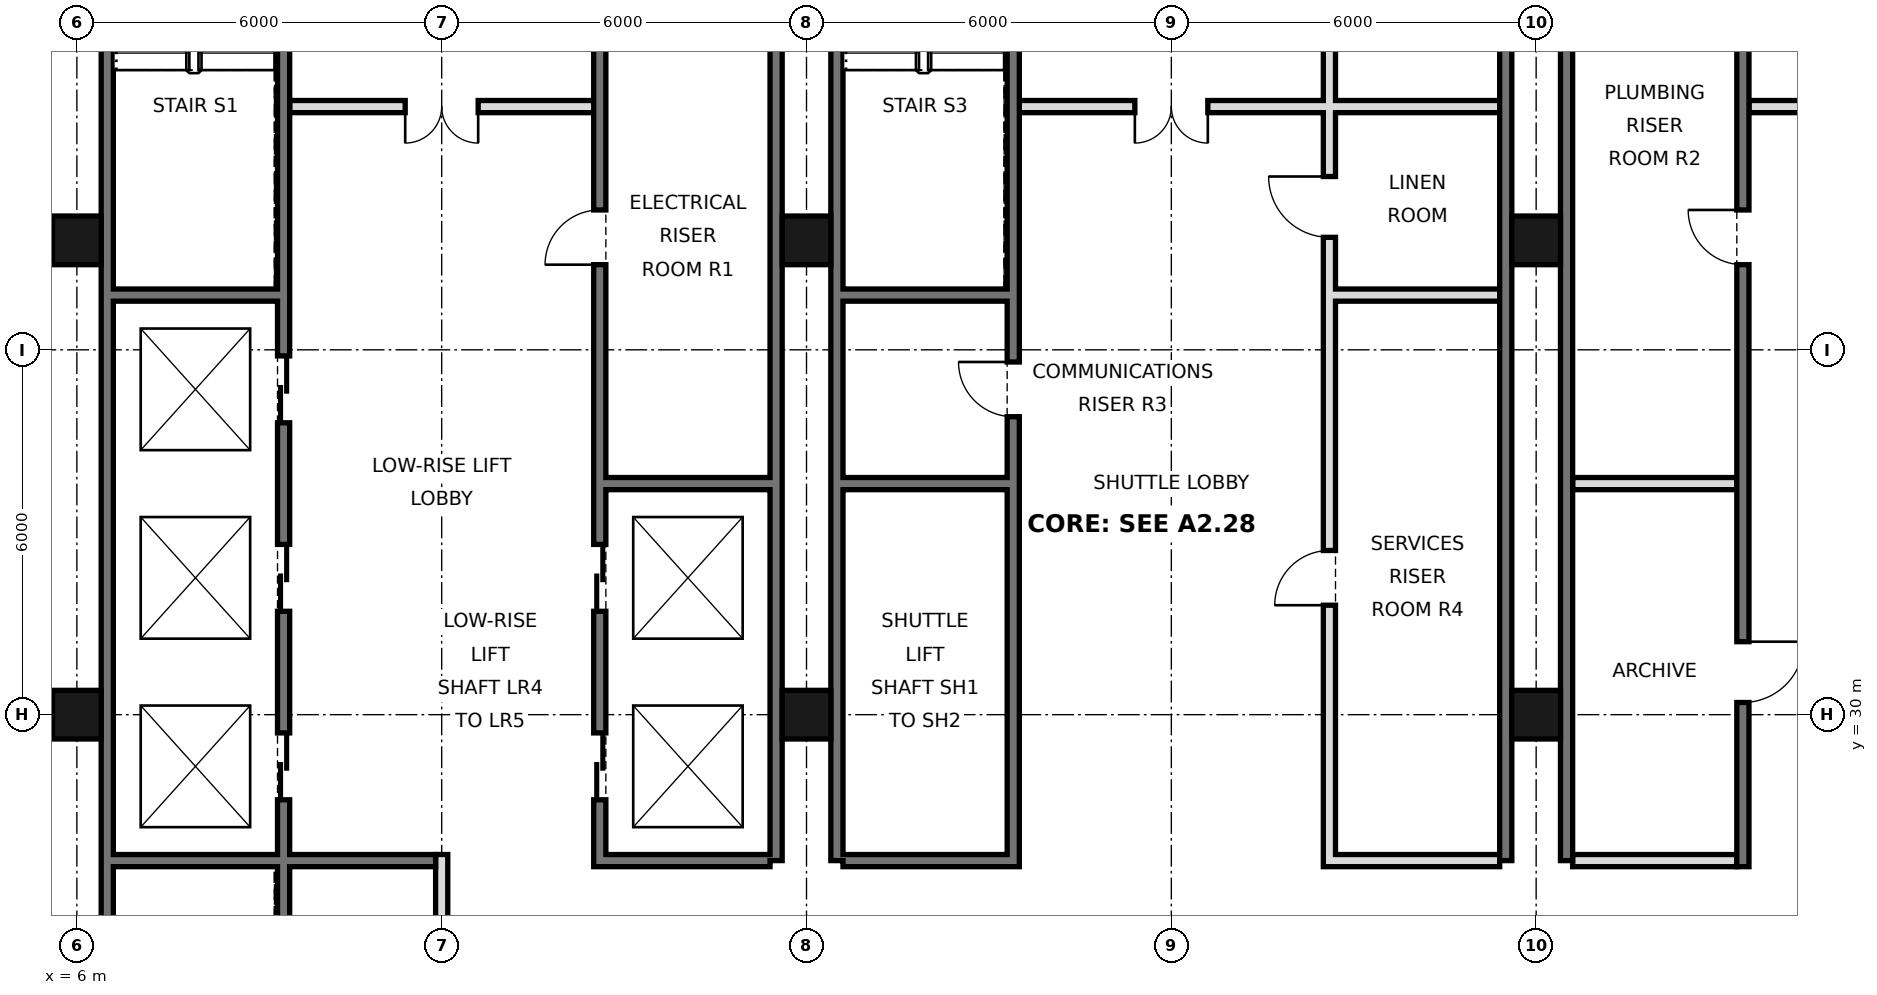
"""IFC4 building model, lengths in metres.
Left out: names, types, materials, properties, quantities, classifications, styles, units other than length and angle.
Written with IfcOpenShell. Run it as: python <this file> out.ifc"""

import sys

from ifc_helpers import new_model, si_unit, direction, frame, frame_2d, origin, origin_2d, place, context, subcontext, project, spatial, rectangle, hollow_rectangle, extrude, element, fill, save


model = new_model("IFC4")
c1 = context("Model", 3, precision=1e-05, world=origin(), true_north=direction((0.0, 1.0)))
c2 = subcontext(c1, "Body", "Model", "MODEL_VIEW")
j1 = project(units=[si_unit("LENGTHUNIT", "METRE"), si_unit("PLANEANGLEUNIT", "RADIAN")], contexts=[c1])
p1 = place(None, origin())
s1 = spatial("IfcSite", under=j1, at=p1, CompositionType="ELEMENT")
p2 = place(p1, origin())
s2 = spatial("IfcBuilding", under=s1, at=p2, CompositionType="ELEMENT")
p3 = place(p2, frame((0.0, 0.0, 110.6)))
s3 = spatial("IfcBuildingStorey", under=s2, at=p3, CompositionType="ELEMENT", Elevation=110.6)
for number, where, z_axis, x_axis in (
    (1, (6.0, 30.0, 0.0), (0.0, 0.0, 1.0), (1.0, 0.0, 0.0)),
    (2, (6.0, 37.8, 0.0), (0.0, 0.0, 1.0), (1.0, 0.0, 0.0)),
    (3, (18.0, 30.0, 0.0), (0.0, 0.0, 1.0), (1.0, 0.0, 0.0)),
    (4, (18.0, 37.8, 0.0), (0.0, 0.0, 1.0), (1.0, 0.0, 0.0)),
    (5, (30.0, 30.0, 0.0), (0.0, 0.0, 1.0), (1.0, 0.0, 0.0)),
    (6, (30.0, 37.8, 0.0), (0.0, 0.0, 1.0), (1.0, 0.0, 0.0)),
):
    element("IfcColumn", number, at=place(p3, frame(where, z_axis=z_axis, x_axis=x_axis)), inside=s3, PredefinedType="COLUMN", context=c2, shape_type="SweptSolid", body=[
        extrude(hollow_rectangle(XDim=0.8, YDim=0.8, WallThickness=0.05, at=origin_2d()), origin(), (0.0, 0.0, 1.0), 3.6),
    ])
p4 = place(p3, frame((6.5, 21.6, 0.0), z_axis=(0.0, 0.0, 1.0), x_axis=(0.0, 1.0, 0.0)))
e7 = element("IfcWall", 7, at=p4, inside=s3, PredefinedType="SOLIDWALL", context=c2, shape_type="SweptSolid", body=[
    extrude(rectangle(XDim=23.5, YDim=0.2, at=frame_2d((11.75, 0.0))), origin(), (0.0, 0.0, 1.0), 3.38),
])
for number, where, z_axis, x_axis in (
    (8, (17.5, 27.6, 0.0), (0.0, 0.0, 1.0), (0.0, 1.0, 0.0)),
    (9, (18.5, 27.6, 0.0), (0.0, 0.0, 1.0), (0.0, 1.0, 0.0)),
    (10, (29.5, 27.6, 0.0), (0.0, 0.0, 1.0), (0.0, 1.0, 0.0)),
    (11, (30.5, 27.6, 0.0), (0.0, 0.0, 1.0), (0.0, 1.0, 0.0)),
):
    element("IfcWall", number, at=place(p3, frame(where, z_axis=z_axis, x_axis=x_axis)), inside=s3, PredefinedType="SOLIDWALL", context=c2, shape_type="SweptSolid", body=[
        extrude(rectangle(XDim=17.5, YDim=0.2, at=frame_2d((8.75, 0.0))), origin(), (0.0, 0.0, 1.0), 3.38),
    ])
p5 = place(p3, frame((12.0, 21.6, 0.0), z_axis=(0.0, 0.0, 1.0), x_axis=(0.0, 1.0, 0.0)))
e12 = element("IfcWall", 12, at=p5, inside=s3, PredefinedType="PARTITIONING", context=c2, shape_type="SweptSolid", body=[
    extrude(rectangle(XDim=6.1, YDim=0.2, at=frame_2d((3.05, 0.0))), origin(), (0.0, 0.0, 1.0), 3.38),
])
p6 = place(p3, frame((14.6, 27.5, 0.0), z_axis=(0.0, 0.0, 1.0), x_axis=(0.0, 1.0, 0.0)))
e13 = element("IfcWall", 13, at=p6, inside=s3, PredefinedType="SOLIDWALL", context=c2, shape_type="SweptSolid", body=[
    extrude(rectangle(XDim=17.5, YDim=0.2, at=frame_2d((8.75, 0.0))), origin(), (0.0, 0.0, 1.0), 3.38),
])
p7 = place(p6, frame((1.1, 0.0, 0.0)))
e14 = element("IfcOpeningElement", 14, at=p7, cuts=e13, PredefinedType="OPENING", context=c2, shape_type="SweptSolid", body=[
    extrude(rectangle(XDim=1.1, YDim=2.1, at=frame_2d((0.55, 1.05))), frame((0.0, 0.11, 0.0), z_axis=(0.0, -1.0, 0.0), x_axis=(1.0, 0.0, 0.0)), (0.0, 0.0, 1.0), 0.22),
])
p8 = place(p6, frame((4.2, 0.0, 0.0)))
e15 = element("IfcOpeningElement", 15, at=p8, cuts=e13, PredefinedType="OPENING", context=c2, shape_type="SweptSolid", body=[
    extrude(rectangle(XDim=1.1, YDim=2.1, at=frame_2d((0.55, 1.05))), frame((0.0, 0.11, 0.0), z_axis=(0.0, -1.0, 0.0), x_axis=(1.0, 0.0, 0.0)), (0.0, 0.0, 1.0), 0.22),
])
p9 = place(p6, frame((15.4, 0.0, 0.0)))
e16 = element("IfcOpeningElement", 16, at=p9, cuts=e13, PredefinedType="OPENING", context=c2, shape_type="SweptSolid", body=[
    extrude(rectangle(XDim=1.1, YDim=2.1, at=frame_2d((0.55, 1.05))), frame((0.0, 0.11, 0.0), z_axis=(0.0, -1.0, 0.0), x_axis=(1.0, 0.0, 0.0)), (0.0, 0.0, 1.0), 0.22),
])
p10 = place(p6, frame((9.9, 0.0, 0.0)))
e17 = element("IfcOpeningElement", 17, at=p10, cuts=e13, PredefinedType="OPENING", context=c2, shape_type="SweptSolid", body=[
    extrude(rectangle(XDim=0.9, YDim=2.1, at=frame_2d((0.45, 1.05))), frame((0.0, 0.11, 0.0), z_axis=(0.0, -1.0, 0.0), x_axis=(1.0, 0.0, 0.0)), (0.0, 0.0, 1.0), 0.22),
])
p11 = place(p3, frame((21.4, 27.5, 0.0), z_axis=(0.0, 0.0, 1.0), x_axis=(0.0, 1.0, 0.0)))
e18 = element("IfcWall", 18, at=p11, inside=s3, PredefinedType="SOLIDWALL", context=c2, shape_type="SweptSolid", body=[
    extrude(rectangle(XDim=17.5, YDim=0.2, at=frame_2d((8.75, 0.0))), origin(), (0.0, 0.0, 1.0), 3.38),
])
p12 = place(p11, frame((16.2, 0.0, 0.0)))
e19 = element("IfcOpeningElement", 19, at=p12, cuts=e18, PredefinedType="OPENING", context=c2, shape_type="SweptSolid", body=[
    extrude(rectangle(XDim=1.0, YDim=2.1, at=frame_2d((0.5, 1.05))), frame((0.0, 0.11, 0.0), z_axis=(0.0, -1.0, 0.0), x_axis=(1.0, 0.0, 0.0)), (0.0, 0.0, 1.0), 0.22),
])
p13 = place(p11, frame((7.4, 0.0, 0.0)))
e20 = element("IfcOpeningElement", 20, at=p13, cuts=e18, PredefinedType="OPENING", context=c2, shape_type="SweptSolid", body=[
    extrude(rectangle(XDim=0.9, YDim=2.1, at=frame_2d((0.45, 1.05))), frame((0.0, 0.11, 0.0), z_axis=(0.0, -1.0, 0.0), x_axis=(1.0, 0.0, 0.0)), (0.0, 0.0, 1.0), 0.22),
])
p14 = place(p3, frame((26.6, 27.5, 0.0), z_axis=(0.0, 0.0, 1.0), x_axis=(0.0, 1.0, 0.0)))
e21 = element("IfcWall", 21, at=p14, inside=s3, PredefinedType="SOLIDWALL", context=c2, shape_type="SweptSolid", body=[
    extrude(rectangle(XDim=17.5, YDim=0.2, at=frame_2d((8.75, 0.0))), origin(), (0.0, 0.0, 1.0), 3.38),
])
p15 = place(p14, frame((4.3, 0.0, 0.0)))
e22 = element("IfcOpeningElement", 22, at=p15, cuts=e21, PredefinedType="OPENING", context=c2, shape_type="SweptSolid", body=[
    extrude(rectangle(XDim=0.9, YDim=2.1, at=frame_2d((0.45, 1.05))), frame((0.0, 0.11, 0.0), z_axis=(0.0, -1.0, 0.0), x_axis=(1.0, 0.0, 0.0)), (0.0, 0.0, 1.0), 0.22),
])
p16 = place(p14, frame((10.35, 0.0, 0.0)))
e23 = element("IfcOpeningElement", 23, at=p16, cuts=e21, PredefinedType="OPENING", context=c2, shape_type="SweptSolid", body=[
    extrude(rectangle(XDim=1.0, YDim=2.1, at=frame_2d((0.5, 1.05))), frame((0.0, 0.11, 0.0), z_axis=(0.0, -1.0, 0.0), x_axis=(1.0, 0.0, 0.0)), (0.0, 0.0, 1.0), 0.22),
])
p17 = place(p14, frame((14.575, 0.0, 0.0)))
e24 = element("IfcOpeningElement", 24, at=p17, cuts=e21, PredefinedType="OPENING", context=c2, shape_type="SweptSolid", body=[
    extrude(rectangle(XDim=1.0, YDim=2.1, at=frame_2d((0.5, 1.05))), frame((0.0, 0.11, 0.0), z_axis=(0.0, -1.0, 0.0), x_axis=(1.0, 0.0, 0.0)), (0.0, 0.0, 1.0), 0.22),
])
p18 = place(p3, frame((33.4, 27.5, 0.0), z_axis=(0.0, 0.0, 1.0), x_axis=(0.0, 1.0, 0.0)))
e25 = element("IfcWall", 25, at=p18, inside=s3, PredefinedType="SOLIDWALL", context=c2, shape_type="SweptSolid", body=[
    extrude(rectangle(XDim=17.5, YDim=0.2, at=frame_2d((8.75, 0.0))), origin(), (0.0, 0.0, 1.0), 3.38),
])
p19 = place(p18, frame((15.4, 0.0, 0.0)))
e26 = element("IfcOpeningElement", 26, at=p19, cuts=e25, PredefinedType="OPENING", context=c2, shape_type="SweptSolid", body=[
    extrude(rectangle(XDim=1.1, YDim=2.1, at=frame_2d((0.55, 1.05))), frame((0.0, 0.11, 0.0), z_axis=(0.0, -1.0, 0.0), x_axis=(1.0, 0.0, 0.0)), (0.0, 0.0, 1.0), 0.22),
])
p20 = place(p18, frame((2.7, 0.0, 0.0)))
e27 = element("IfcOpeningElement", 27, at=p20, cuts=e25, PredefinedType="OPENING", context=c2, shape_type="SweptSolid", body=[
    extrude(rectangle(XDim=1.0, YDim=2.1, at=frame_2d((0.5, 1.05))), frame((0.0, 0.11, 0.0), z_axis=(0.0, -1.0, 0.0), x_axis=(1.0, 0.0, 0.0)), (0.0, 0.0, 1.0), 0.22),
])
p21 = place(p18, frame((9.9, 0.0, 0.0)))
e28 = element("IfcOpeningElement", 28, at=p21, cuts=e25, PredefinedType="OPENING", context=c2, shape_type="SweptSolid", body=[
    extrude(rectangle(XDim=0.9, YDim=2.1, at=frame_2d((0.45, 1.05))), frame((0.0, 0.11, 0.0), z_axis=(0.0, -1.0, 0.0), x_axis=(1.0, 0.0, 0.0)), (0.0, 0.0, 1.0), 0.22),
])
p22 = place(p3, frame((9.4, 21.6, 0.0), z_axis=(0.0, 0.0, 1.0), x_axis=(0.0, 1.0, 0.0)))
e29 = element("IfcWall", 29, at=p22, inside=s3, PredefinedType="SOLIDWALL", context=c2, shape_type="SweptSolid", body=[
    extrude(rectangle(XDim=23.4, YDim=0.2, at=frame_2d((11.7, 0.0))), origin(), (0.0, 0.0, 1.0), 3.38),
])
p23 = place(p22, frame((7.0, 0.0, 0.0)))
e30 = element("IfcOpeningElement", 30, at=p23, cuts=e29, PredefinedType="OPENING", context=c2, shape_type="SweptSolid", body=[
    extrude(rectangle(XDim=1.1, YDim=2.1, at=frame_2d((0.55, 1.05))), frame((0.0, 0.11, 0.0), z_axis=(0.0, -1.0, 0.0), x_axis=(1.0, 0.0, 0.0)), (0.0, 0.0, 1.0), 0.22),
])
p24 = place(p22, frame((10.1, 0.0, 0.0)))
e31 = element("IfcOpeningElement", 31, at=p24, cuts=e29, PredefinedType="OPENING", context=c2, shape_type="SweptSolid", body=[
    extrude(rectangle(XDim=1.1, YDim=2.1, at=frame_2d((0.55, 1.05))), frame((0.0, 0.11, 0.0), z_axis=(0.0, -1.0, 0.0), x_axis=(1.0, 0.0, 0.0)), (0.0, 0.0, 1.0), 0.22),
])
p25 = place(p22, frame((13.2, 0.0, 0.0)))
e32 = element("IfcOpeningElement", 32, at=p25, cuts=e29, PredefinedType="OPENING", context=c2, shape_type="SweptSolid", body=[
    extrude(rectangle(XDim=1.1, YDim=2.1, at=frame_2d((0.55, 1.05))), frame((0.0, 0.11, 0.0), z_axis=(0.0, -1.0, 0.0), x_axis=(1.0, 0.0, 0.0)), (0.0, 0.0, 1.0), 0.22),
])
p26 = place(p22, frame((22.1, 0.0, 0.0)))
e33 = element("IfcOpeningElement", 33, at=p26, cuts=e29, PredefinedType="OPENING", context=c2, shape_type="SweptSolid", body=[
    extrude(rectangle(XDim=1.0, YDim=2.1, at=frame_2d((0.5, 1.05))), frame((0.0, 0.11, 0.0), z_axis=(0.0, -1.0, 0.0), x_axis=(1.0, 0.0, 0.0)), (0.0, 0.0, 1.0), 0.22),
])
p27 = place(p22, frame((0.175, 0.0, 0.0)))
e34 = element("IfcOpeningElement", 34, at=p27, cuts=e29, PredefinedType="OPENING", context=c2, shape_type="SweptSolid", body=[
    extrude(rectangle(XDim=0.9, YDim=2.1, at=frame_2d((0.45, 1.05))), frame((0.0, 0.11, 0.0), z_axis=(0.0, -1.0, 0.0), x_axis=(1.0, 0.0, 0.0)), (0.0, 0.0, 1.0), 0.22),
])
for number, where, z_axis, x_axis in (
    (35, (14.7, 27.6, 0.0), (0.0, 0.0, 1.0), (1.0, 0.0, 0.0)),
    (36, (18.6, 27.6, 0.0), (0.0, 0.0, 1.0), (1.0, 0.0, 0.0)),
    (37, (26.7, 27.6, 0.0), (0.0, 0.0, 1.0), (1.0, 0.0, 0.0)),
):
    element("IfcWall", number, at=place(p3, frame(where, z_axis=z_axis, x_axis=x_axis)), inside=s3, PredefinedType="SOLIDWALL", context=c2, shape_type="SweptSolid", body=[
        extrude(rectangle(XDim=2.7, YDim=0.2, at=frame_2d((1.35, 0.0))), origin(), (0.0, 0.0, 1.0), 3.38),
    ])
p28 = place(p3, frame((30.6, 27.6, 0.0), z_axis=(0.0, 0.0, 1.0), x_axis=(1.0, 0.0, 0.0)))
e38 = element("IfcWall", 38, at=p28, inside=s3, PredefinedType="PARTITIONING", context=c2, shape_type="SweptSolid", body=[
    extrude(rectangle(XDim=2.7, YDim=0.2, at=frame_2d((1.35, 0.0))), origin(), (0.0, 0.0, 1.0), 3.38),
])
p29 = place(p3, frame((6.6, 27.6, 0.0), z_axis=(0.0, 0.0, 1.0), x_axis=(1.0, 0.0, 0.0)))
e39 = element("IfcWall", 39, at=p29, inside=s3, PredefinedType="SOLIDWALL", context=c2, shape_type="SweptSolid", body=[
    extrude(rectangle(XDim=5.3, YDim=0.2, at=frame_2d((2.65, 0.0))), origin(), (0.0, 0.0, 1.0), 3.38),
])
for number, where, z_axis, x_axis in (
    (40, (14.7, 33.8, 0.0), (0.0, 0.0, 1.0), (1.0, 0.0, 0.0)),
    (41, (18.6, 33.8, 0.0), (0.0, 0.0, 1.0), (1.0, 0.0, 0.0)),
    (42, (30.6, 33.8, 0.0), (0.0, 0.0, 1.0), (1.0, 0.0, 0.0)),
    (43, (18.6, 36.9, 0.0), (0.0, 0.0, 1.0), (1.0, 0.0, 0.0)),
    (44, (26.7, 36.9, 0.0), (0.0, 0.0, 1.0), (1.0, 0.0, 0.0)),
    (45, (6.6, 36.9, 0.0), (0.0, 0.0, 1.0), (1.0, 0.0, 0.0)),
):
    element("IfcWall", number, at=place(p3, frame(where, z_axis=z_axis, x_axis=x_axis)), inside=s3, PredefinedType="SOLIDWALL", context=c2, shape_type="SweptSolid", body=[
        extrude(rectangle(XDim=2.7, YDim=0.2, at=frame_2d((1.35, 0.0))), origin(), (0.0, 0.0, 1.0), 3.38),
    ])
p30 = place(p3, frame((21.5, 40.0, 0.0), z_axis=(0.0, 0.0, 1.0), x_axis=(1.0, 0.0, 0.0)))
e46 = element("IfcWall", 46, at=p30, inside=s3, PredefinedType="PARTITIONING", context=c2, shape_type="SweptSolid", body=[
    extrude(rectangle(XDim=7.9, YDim=0.2, at=frame_2d((3.95, 0.0))), origin(), (0.0, 0.0, 1.0), 3.38),
])
p31 = place(p30, frame((1.9, 0.0, 0.0)))
e47 = element("IfcOpeningElement", 47, at=p31, cuts=e46, PredefinedType="OPENING", context=c2, shape_type="SweptSolid", body=[
    extrude(rectangle(XDim=1.2, YDim=2.1, at=frame_2d((0.6, 1.05))), frame((0.0, 0.11, 0.0), z_axis=(0.0, -1.0, 0.0), x_axis=(1.0, 0.0, 0.0)), (0.0, 0.0, 1.0), 0.22),
])
p32 = place(p3, frame((33.5, 40.0, 0.0), z_axis=(0.0, 0.0, 1.0), x_axis=(1.0, 0.0, 0.0)))
e48 = element("IfcWall", 48, at=p32, inside=s3, PredefinedType="PARTITIONING", context=c2, shape_type="SweptSolid", body=[
    extrude(rectangle(XDim=5.0, YDim=0.2, at=frame_2d((2.5, 0.0))), origin(), (0.0, 0.0, 1.0), 3.38),
])
p33 = place(p32, frame((1.9, 0.0, 0.0)))
e49 = element("IfcOpeningElement", 49, at=p33, cuts=e48, PredefinedType="OPENING", context=c2, shape_type="SweptSolid", body=[
    extrude(rectangle(XDim=1.2, YDim=2.1, at=frame_2d((0.6, 1.05))), frame((0.0, 0.11, 0.0), z_axis=(0.0, -1.0, 0.0), x_axis=(1.0, 0.0, 0.0)), (0.0, 0.0, 1.0), 0.22),
])
p34 = place(p3, frame((9.5, 40.0, 0.0), z_axis=(0.0, 0.0, 1.0), x_axis=(1.0, 0.0, 0.0)))
e50 = element("IfcWall", 50, at=p34, inside=s3, PredefinedType="PARTITIONING", context=c2, shape_type="SweptSolid", body=[
    extrude(rectangle(XDim=5.0, YDim=0.2, at=frame_2d((2.5, 0.0))), origin(), (0.0, 0.0, 1.0), 3.38),
])
p35 = place(p34, frame((1.9, 0.0, 0.0)))
e51 = element("IfcOpeningElement", 51, at=p35, cuts=e50, PredefinedType="OPENING", context=c2, shape_type="SweptSolid", body=[
    extrude(rectangle(XDim=1.2, YDim=2.1, at=frame_2d((0.6, 1.05))), frame((0.0, 0.11, 0.0), z_axis=(0.0, -1.0, 0.0), x_axis=(1.0, 0.0, 0.0)), (0.0, 0.0, 1.0), 0.22),
])
p36 = place(p35, frame((1.2, 0.0, 0.0), z_axis=(0.0, 0.0, 1.0), x_axis=(-1.0, 0.0, 0.0)))
e52 = element("IfcDoor", 52, at=p36, inside=s3, OperationType="DOUBLE_DOOR_SINGLE_SWING", PredefinedType="DOOR", context=c2, shape_type="SweptSolid", body=[
    extrude(rectangle(XDim=1.2, YDim=2.1, at=frame_2d((0.6, 1.05))), frame((0.0, 0.025, 0.0), z_axis=(0.0, -1.0, 0.0), x_axis=(1.0, 0.0, 0.0)), (0.0, 0.0, 1.0), 0.05),
])
fill(e51, e52)
p37 = place(p31, frame((1.2, 0.0, 0.0), z_axis=(0.0, 0.0, 1.0), x_axis=(-1.0, 0.0, 0.0)))
e53 = element("IfcDoor", 53, at=p37, inside=s3, OperationType="DOUBLE_DOOR_SINGLE_SWING", PredefinedType="DOOR", context=c2, shape_type="SweptSolid", body=[
    extrude(rectangle(XDim=1.2, YDim=2.1, at=frame_2d((0.6, 1.05))), frame((0.0, 0.025, 0.0), z_axis=(0.0, -1.0, 0.0), x_axis=(1.0, 0.0, 0.0)), (0.0, 0.0, 1.0), 0.05),
])
fill(e47, e53)
p38 = place(p7, origin())
e54 = element("IfcDoor", 54, at=p38, inside=s3, OperationType="DOUBLE_DOOR_SLIDING", PredefinedType="DOOR", context=c2, shape_type="SweptSolid", body=[
    extrude(rectangle(XDim=1.1, YDim=2.1, at=frame_2d((0.55, 1.05))), frame((0.0, 0.025, 0.0), z_axis=(0.0, -1.0, 0.0), x_axis=(1.0, 0.0, 0.0)), (0.0, 0.0, 1.0), 0.05),
])
fill(e14, e54)
p39 = place(p8, origin())
e55 = element("IfcDoor", 55, at=p39, inside=s3, OperationType="DOUBLE_DOOR_SLIDING", PredefinedType="DOOR", context=c2, shape_type="SweptSolid", body=[
    extrude(rectangle(XDim=1.1, YDim=2.1, at=frame_2d((0.55, 1.05))), frame((0.0, 0.025, 0.0), z_axis=(0.0, -1.0, 0.0), x_axis=(1.0, 0.0, 0.0)), (0.0, 0.0, 1.0), 0.05),
])
fill(e15, e55)
p40 = place(p23, origin())
e56 = element("IfcDoor", 56, at=p40, inside=s3, OperationType="DOUBLE_DOOR_SLIDING", PredefinedType="DOOR", context=c2, shape_type="SweptSolid", body=[
    extrude(rectangle(XDim=1.1, YDim=2.1, at=frame_2d((0.55, 1.05))), frame((0.0, 0.025, 0.0), z_axis=(0.0, -1.0, 0.0), x_axis=(1.0, 0.0, 0.0)), (0.0, 0.0, 1.0), 0.05),
])
fill(e30, e56)
p41 = place(p24, origin())
e57 = element("IfcDoor", 57, at=p41, inside=s3, OperationType="DOUBLE_DOOR_SLIDING", PredefinedType="DOOR", context=c2, shape_type="SweptSolid", body=[
    extrude(rectangle(XDim=1.1, YDim=2.1, at=frame_2d((0.55, 1.05))), frame((0.0, 0.025, 0.0), z_axis=(0.0, -1.0, 0.0), x_axis=(1.0, 0.0, 0.0)), (0.0, 0.0, 1.0), 0.05),
])
fill(e31, e57)
p42 = place(p25, origin())
e58 = element("IfcDoor", 58, at=p42, inside=s3, OperationType="DOUBLE_DOOR_SLIDING", PredefinedType="DOOR", context=c2, shape_type="SweptSolid", body=[
    extrude(rectangle(XDim=1.1, YDim=2.1, at=frame_2d((0.55, 1.05))), frame((0.0, 0.025, 0.0), z_axis=(0.0, -1.0, 0.0), x_axis=(1.0, 0.0, 0.0)), (0.0, 0.0, 1.0), 0.05),
])
fill(e32, e58)
p43 = place(p20, origin())
e59 = element("IfcDoor", 59, at=p43, inside=s3, OperationType="SINGLE_SWING_RIGHT", PredefinedType="DOOR", context=c2, shape_type="SweptSolid", body=[
    extrude(rectangle(XDim=1.0, YDim=2.1, at=frame_2d((0.5, 1.05))), frame((0.0, 0.025, 0.0), z_axis=(0.0, -1.0, 0.0), x_axis=(1.0, 0.0, 0.0)), (0.0, 0.0, 1.0), 0.05),
])
fill(e27, e59)
p44 = place(p10, origin())
e60 = element("IfcDoor", 60, at=p44, inside=s3, OperationType="SINGLE_SWING_LEFT", PredefinedType="DOOR", context=c2, shape_type="SweptSolid", body=[
    extrude(rectangle(XDim=0.9, YDim=2.1, at=frame_2d((0.45, 1.05))), frame((0.0, 0.025, 0.0), z_axis=(0.0, -1.0, 0.0), x_axis=(1.0, 0.0, 0.0)), (0.0, 0.0, 1.0), 0.05),
])
fill(e17, e60)
p45 = place(p21, frame((0.9, 0.0, 0.0), z_axis=(0.0, 0.0, 1.0), x_axis=(-1.0, 0.0, 0.0)))
e61 = element("IfcDoor", 61, at=p45, inside=s3, OperationType="SINGLE_SWING_LEFT", PredefinedType="DOOR", context=c2, shape_type="SweptSolid", body=[
    extrude(rectangle(XDim=0.9, YDim=2.1, at=frame_2d((0.45, 1.05))), frame((0.0, 0.025, 0.0), z_axis=(0.0, -1.0, 0.0), x_axis=(1.0, 0.0, 0.0)), (0.0, 0.0, 1.0), 0.05),
])
fill(e28, e61)
p46 = place(p13, frame((0.9, 0.0, 0.0), z_axis=(0.0, 0.0, 1.0), x_axis=(-1.0, 0.0, 0.0)))
e62 = element("IfcDoor", 62, at=p46, inside=s3, OperationType="SINGLE_SWING_LEFT", PredefinedType="DOOR", context=c2, shape_type="SweptSolid", body=[
    extrude(rectangle(XDim=0.9, YDim=2.1, at=frame_2d((0.45, 1.05))), frame((0.0, 0.025, 0.0), z_axis=(0.0, -1.0, 0.0), x_axis=(1.0, 0.0, 0.0)), (0.0, 0.0, 1.0), 0.05),
])
fill(e20, e62)
p47 = place(p15, origin())
e63 = element("IfcDoor", 63, at=p47, inside=s3, OperationType="SINGLE_SWING_LEFT", PredefinedType="DOOR", context=c2, shape_type="SweptSolid", body=[
    extrude(rectangle(XDim=0.9, YDim=2.1, at=frame_2d((0.45, 1.05))), frame((0.0, 0.025, 0.0), z_axis=(0.0, -1.0, 0.0), x_axis=(1.0, 0.0, 0.0)), (0.0, 0.0, 1.0), 0.05),
])
fill(e22, e63)
p48 = place(p16, frame((1.0, 0.0, 0.0), z_axis=(0.0, 0.0, 1.0), x_axis=(-1.0, 0.0, 0.0)))
e64 = element("IfcDoor", 64, at=p48, inside=s3, OperationType="SINGLE_SWING_LEFT", PredefinedType="DOOR", context=c2, shape_type="SweptSolid", body=[
    extrude(rectangle(XDim=1.0, YDim=2.1, at=frame_2d((0.5, 1.05))), frame((0.0, 0.025, 0.0), z_axis=(0.0, -1.0, 0.0), x_axis=(1.0, 0.0, 0.0)), (0.0, 0.0, 1.0), 0.05),
])
fill(e23, e64)
save(model, sys.argv[1])
